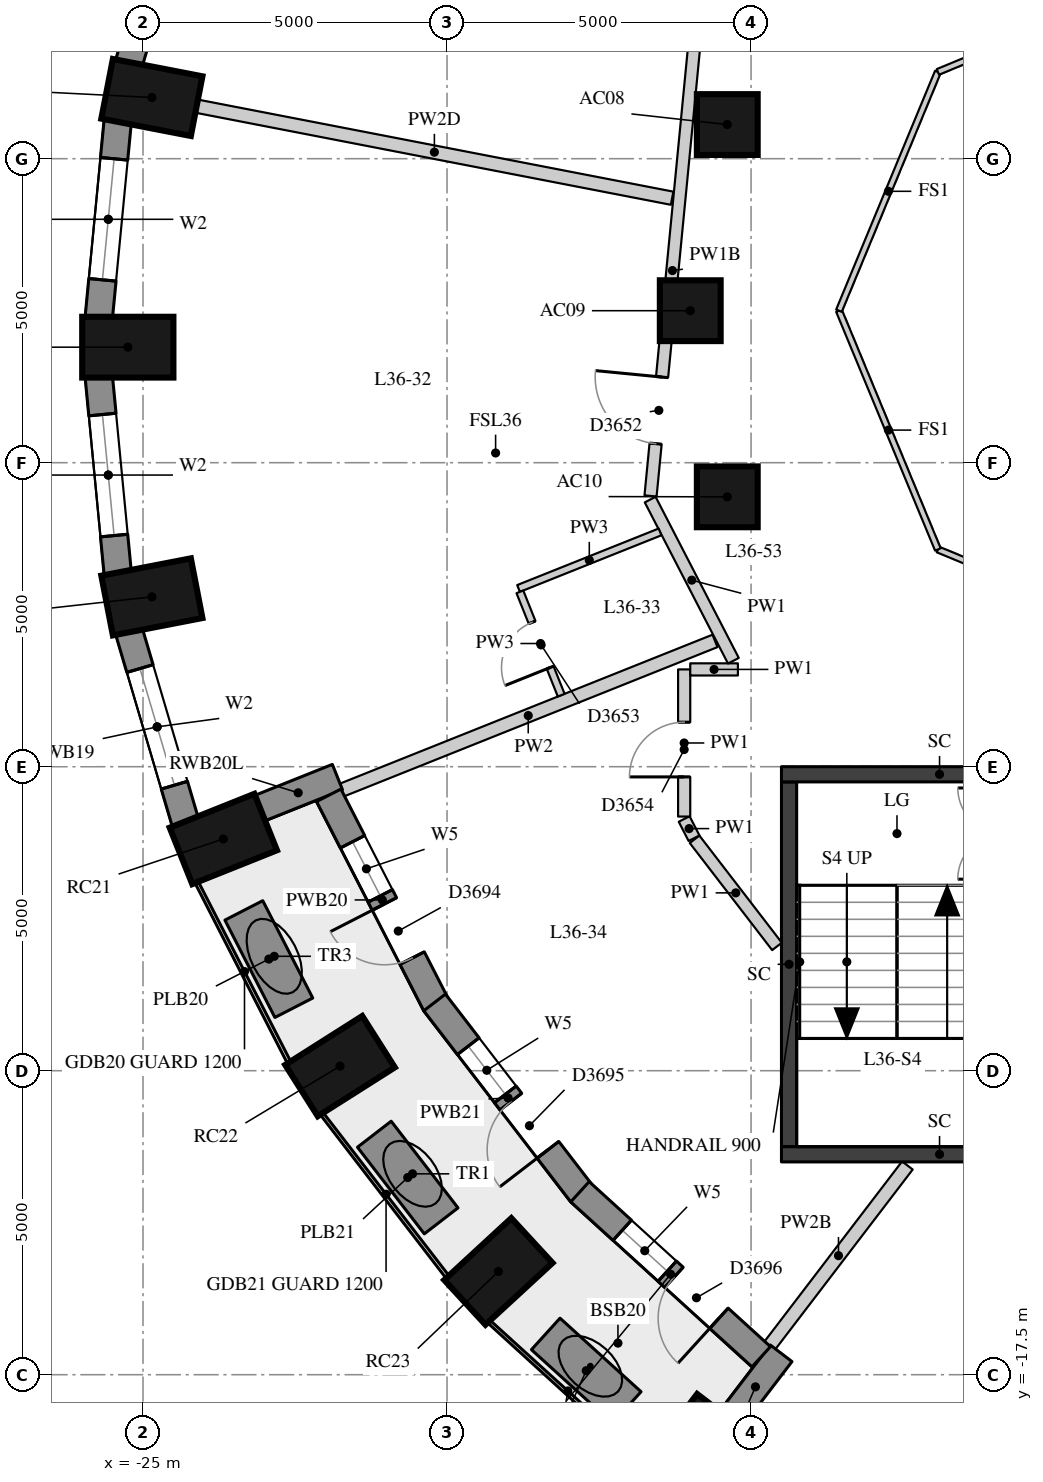
"""IFC4 building model, lengths in metres.
Left out: names, types, materials, properties, quantities, classifications, styles, units other than length and angle.
Written with IfcOpenShell. Run it as: python <this file> out.ifc"""

import sys

from ifc_helpers import new_model, si_unit, direction, frame, frame_2d, origin, origin_2d, place, context, subcontext, project, spatial, rectangle, extrude, element, fill, save


model = new_model("IFC4")
c1 = context("Model", 3, precision=1e-05, world=origin(), true_north=direction((0.0, 1.0)))
c2 = subcontext(c1, "Body", "Model", "MODEL_VIEW")
j1 = project(units=[si_unit("LENGTHUNIT", "METRE"), si_unit("PLANEANGLEUNIT", "RADIAN")], contexts=[c1])
p1 = place(None, origin())
s1 = spatial("IfcSite", under=j1, at=p1, CompositionType="ELEMENT")
p2 = place(p1, origin())
s2 = spatial("IfcBuilding", under=s1, at=p2, CompositionType="ELEMENT")
p3 = place(p2, frame((0.0, 0.0, 128.5)))
s3 = spatial("IfcBuildingStorey", under=s2, at=p3, CompositionType="ELEMENT", Elevation=128.5)
for number, where, z_axis, x_axis in (
    (1, (-24.854, 3.507, 0.0), (0.0, 0.0, 1.0), (-0.982, 0.19, 0.0)),
    (2, (-25.25, -0.6, 0.0), (0.0, 0.0, 1.0), (-1.0, 0.0, 0.0)),
    (3, (-24.854, -4.707, 0.0), (0.0, 0.0, 1.0), (-0.982, -0.19, 0.0)),
    (4, (-23.679, -8.689, 0.0), (0.0, 0.0, 1.0), (-0.929, -0.371, 0.0)),
    (5, (-21.76, -12.425, 0.0), (0.0, 0.0, 1.0), (-0.845, -0.536, 0.0)),
    (6, (-19.156, -15.802, 0.0), (0.0, 0.0, 1.0), (-0.735, -0.678, 0.0)),
    (7, (-15.945, -18.717, 0.0), (0.0, 0.0, 1.0), (-0.607, -0.795, 0.0)),
):
    element("IfcColumn", number, at=place(p3, frame(where, z_axis=z_axis, x_axis=x_axis)), inside=s3, PredefinedType="COLUMN", context=c2, shape_type="SweptSolid", body=[
        extrude(rectangle(XDim=1.5, YDim=1.0, at=origin_2d()), origin(), (0.0, 0.0, 1.0), 3.3),
    ])
for number, where, z_axis, x_axis in (
    (8, (-15.391, 3.062, 0.0), (0.0, 0.0, 1.0), (1.0, 0.0, 0.0)),
    (9, (-16.0, 0.0, 0.0), (0.0, 0.0, 1.0), (1.0, 0.0, 0.0)),
    (10, (-15.391, -3.062, 0.0), (0.0, 0.0, 1.0), (1.0, 0.0, 0.0)),
):
    element("IfcColumn", number, at=place(p3, frame(where, z_axis=z_axis, x_axis=x_axis)), inside=s3, PredefinedType="COLUMN", context=c2, shape_type="SweptSolid", body=[
        extrude(rectangle(XDim=1.0, YDim=1.0, at=origin_2d()), origin(), (0.0, 0.0, 1.0), 3.3),
    ])
p4 = place(p3, frame((-24.302, 7.221, 0.0), z_axis=(0.0, 0.0, 1.0), x_axis=(-0.283071248438, -0.959098883488, 0.0)))
e11 = element("IfcWall", 11, at=p4, inside=s3, PredefinedType="SOLIDWALL", context=c2, shape_type="SweptSolid", body=[
    extrude(rectangle(XDim=3.286, YDim=0.45, at=frame_2d((1.643, 0.0))), origin(), (0.0, 0.0, 1.0), 3.02),
])
p5 = place(p4, frame((0.643, 0.0, 0.4)))
e12 = element("IfcOpeningElement", 12, at=p5, cuts=e11, PredefinedType="OPENING", context=c2, shape_type="SweptSolid", body=[
    extrude(rectangle(XDim=2.0, YDim=1.75, at=frame_2d((1.0, 0.875))), frame((0.0, 0.235, 0.0), z_axis=(0.0, -1.0, 0.0), x_axis=(1.0, 0.0, 0.0)), (0.0, 0.0, 1.0), 0.47),
])
p6 = place(p3, frame((-25.415, 3.126, 0.0), z_axis=(0.0, 0.0, 1.0), x_axis=(-0.095967726544, -0.995384446062, 0.0)))
e13 = element("IfcWall", 13, at=p6, inside=s3, PredefinedType="SOLIDWALL", context=c2, shape_type="SweptSolid", body=[
    extrude(rectangle(XDim=3.261, YDim=0.45, at=frame_2d((1.631, 0.0))), origin(), (0.0, 0.0, 1.0), 3.02),
])
p7 = place(p6, frame((0.631, 0.0, 0.4)))
e14 = element("IfcOpeningElement", 14, at=p7, cuts=e13, PredefinedType="OPENING", context=c2, shape_type="SweptSolid", body=[
    extrude(rectangle(XDim=2.0, YDim=1.75, at=frame_2d((1.0, 0.875))), frame((0.0, 0.235, 0.0), z_axis=(0.0, -1.0, 0.0), x_axis=(1.0, 0.0, 0.0)), (0.0, 0.0, 1.0), 0.47),
])
p8 = place(p3, frame((-25.728, -1.08, 0.0), z_axis=(0.0, 0.0, 1.0), x_axis=(0.095967726544, -0.995384446062, 0.0)))
e15 = element("IfcWall", 15, at=p8, inside=s3, PredefinedType="SOLIDWALL", context=c2, shape_type="SweptSolid", body=[
    extrude(rectangle(XDim=3.261, YDim=0.45, at=frame_2d((1.631, 0.0))), origin(), (0.0, 0.0, 1.0), 3.02),
])
p9 = place(p8, frame((0.631, 0.0, 0.4)))
e16 = element("IfcOpeningElement", 16, at=p9, cuts=e15, PredefinedType="OPENING", context=c2, shape_type="SweptSolid", body=[
    extrude(rectangle(XDim=2.0, YDim=1.75, at=frame_2d((1.0, 0.875))), frame((0.0, 0.235, 0.0), z_axis=(0.0, -1.0, 0.0), x_axis=(1.0, 0.0, 0.0)), (0.0, 0.0, 1.0), 0.47),
])
p10 = place(p3, frame((-25.232, -5.269, 0.0), z_axis=(0.0, 0.0, 1.0), x_axis=(0.283051078697, -0.959104836214, 0.0)))
e17 = element("IfcWall", 17, at=p10, inside=s3, PredefinedType="SOLIDWALL", context=c2, shape_type="SweptSolid", body=[
    extrude(rectangle(XDim=3.286, YDim=0.45, at=frame_2d((1.643, 0.0))), origin(), (0.0, 0.0, 1.0), 3.02),
])
p11 = place(p10, frame((0.643, 0.0, 0.4)))
e18 = element("IfcOpeningElement", 18, at=p11, cuts=e17, PredefinedType="OPENING", context=c2, shape_type="SweptSolid", body=[
    extrude(rectangle(XDim=2.0, YDim=1.75, at=frame_2d((1.0, 0.875))), frame((0.0, 0.235, 0.0), z_axis=(0.0, -1.0, 0.0), x_axis=(1.0, 0.0, 0.0)), (0.0, 0.0, 1.0), 0.47),
])
p12 = place(p3, frame((-23.093, -8.187, 0.0), z_axis=(0.0, 0.0, 1.0), x_axis=(0.928549333349, 0.371209018665, 0.0)))
e19 = element("IfcWall", 19, at=p12, inside=s3, PredefinedType="SOLIDWALL", context=c2, shape_type="SweptSolid", body=[
    extrude(rectangle(XDim=1.39, YDim=0.45, at=frame_2d((0.695, 0.0))), origin(), (0.0, 0.0, 1.0), 3.02),
])
p13 = place(p3, frame((-15.35, -18.253, 0.0), z_axis=(0.0, 0.0, 1.0), x_axis=(0.607026495834, 0.794681592435, 0.0)))
e20 = element("IfcWall", 20, at=p13, inside=s3, PredefinedType="SOLIDWALL", context=c2, shape_type="SweptSolid", body=[
    extrude(rectangle(XDim=1.391, YDim=0.45, at=frame_2d((0.695, 0.0))), origin(), (0.0, 0.0, 1.0), 2.57),
])
p14 = place(p3, frame((-21.945, -7.97, 0.0), z_axis=(0.0, 0.0, 1.0), x_axis=(0.455905146579, -0.89002836883, 0.0)))
e21 = element("IfcWall", 21, at=p14, inside=s3, PredefinedType="SOLIDWALL", context=c2, shape_type="SweptSolid", body=[
    extrude(rectangle(XDim=3.867, YDim=0.45, at=frame_2d((1.934, 0.0))), origin(), (0.0, 0.0, 1.0), 3.02),
])
p15 = place(p14, frame((0.858, 0.0, 0.4)))
e22 = element("IfcOpeningElement", 22, at=p15, cuts=e21, PredefinedType="OPENING", context=c2, shape_type="SweptSolid", body=[
    extrude(rectangle(XDim=1.0, YDim=1.75, at=frame_2d((0.5, 0.875))), frame((0.0, 0.235, 0.0), z_axis=(0.0, -1.0, 0.0), x_axis=(1.0, 0.0, 0.0)), (0.0, 0.0, 1.0), 0.47),
])
p16 = place(p14, frame((2.009, 0.0, 0.0)))
e23 = element("IfcOpeningElement", 23, at=p16, cuts=e21, PredefinedType="OPENING", context=c2, shape_type="SweptSolid", body=[
    extrude(rectangle(XDim=1.0, YDim=2.15, at=frame_2d((0.5, 1.075))), frame((0.0, 0.235, 0.0), z_axis=(0.0, -1.0, 0.0), x_axis=(1.0, 0.0, 0.0)), (0.0, 0.0, 1.0), 0.47),
])
p17 = place(p3, frame((-20.204, -11.377, 0.0), z_axis=(0.0, 0.0, 1.0), x_axis=(0.609698858135, -0.792633144897, 0.0)))
e24 = element("IfcWall", 24, at=p17, inside=s3, PredefinedType="SOLIDWALL", context=c2, shape_type="SweptSolid", body=[
    extrude(rectangle(XDim=3.965, YDim=0.45, at=frame_2d((1.982, 0.0))), origin(), (0.0, 0.0, 1.0), 3.02),
])
p18 = place(p17, frame((0.907, 0.0, 0.4)))
e25 = element("IfcOpeningElement", 25, at=p18, cuts=e24, PredefinedType="OPENING", context=c2, shape_type="SweptSolid", body=[
    extrude(rectangle(XDim=1.0, YDim=1.75, at=frame_2d((0.5, 0.875))), frame((0.0, 0.235, 0.0), z_axis=(0.0, -1.0, 0.0), x_axis=(1.0, 0.0, 0.0)), (0.0, 0.0, 1.0), 0.47),
])
p19 = place(p17, frame((2.058, 0.0, 0.0)))
e26 = element("IfcOpeningElement", 26, at=p19, cuts=e24, PredefinedType="OPENING", context=c2, shape_type="SweptSolid", body=[
    extrude(rectangle(XDim=1.0, YDim=2.15, at=frame_2d((0.5, 1.075))), frame((0.0, 0.235, 0.0), z_axis=(0.0, -1.0, 0.0), x_axis=(1.0, 0.0, 0.0)), (0.0, 0.0, 1.0), 0.47),
])
p20 = place(p3, frame((-17.814, -14.491, 0.0), z_axis=(0.0, 0.0, 1.0), x_axis=(0.73951517403, -0.673139886933, 0.0)))
e27 = element("IfcWall", 27, at=p20, inside=s3, PredefinedType="SOLIDWALL", context=c2, shape_type="SweptSolid", body=[
    extrude(rectangle(XDim=4.031, YDim=0.45, at=frame_2d((2.016, 0.0))), origin(), (0.0, 0.0, 1.0), 3.02),
])
p21 = place(p20, frame((0.941, 0.0, 0.4)))
e28 = element("IfcOpeningElement", 28, at=p21, cuts=e27, PredefinedType="OPENING", context=c2, shape_type="SweptSolid", body=[
    extrude(rectangle(XDim=1.0, YDim=1.75, at=frame_2d((0.5, 0.875))), frame((0.0, 0.235, 0.0), z_axis=(0.0, -1.0, 0.0), x_axis=(1.0, 0.0, 0.0)), (0.0, 0.0, 1.0), 0.47),
])
p22 = place(p20, frame((2.091, 0.0, 0.0)))
e29 = element("IfcOpeningElement", 29, at=p22, cuts=e27, PredefinedType="OPENING", context=c2, shape_type="SweptSolid", body=[
    extrude(rectangle(XDim=1.0, YDim=2.15, at=frame_2d((0.5, 1.075))), frame((0.0, 0.235, 0.0), z_axis=(0.0, -1.0, 0.0), x_axis=(1.0, 0.0, 0.0)), (0.0, 0.0, 1.0), 0.47),
])
p23 = place(p3, frame((-23.342, -9.864, 0.0), z_axis=(0.0, 0.0, 1.0), x_axis=(0.456845298981, -0.88954616114, 0.0)))
e30 = element("IfcWall", 30, at=p23, inside=s3, PredefinedType="USERDEFINED", context=c2, shape_type="SweptSolid", body=[
    extrude(rectangle(XDim=1.8, YDim=0.7, at=frame_2d((0.9, 0.0))), origin(), (0.0, 0.0, 1.0), 0.75),
])
p24 = place(p3, frame((-21.196, -13.544, 0.0), z_axis=(0.0, 0.0, 1.0), x_axis=(0.610686846919, -0.791872196127, 0.0)))
e31 = element("IfcWall", 31, at=p24, inside=s3, PredefinedType="USERDEFINED", context=c2, shape_type="SweptSolid", body=[
    extrude(rectangle(XDim=1.8, YDim=0.7, at=frame_2d((0.9, 0.0))), origin(), (0.0, 0.0, 1.0), 0.75),
])
p25 = place(p3, frame((-18.377, -16.829, 0.0), z_axis=(0.0, 0.0, 1.0), x_axis=(0.740332755969, -0.6722405897, 0.0)))
e32 = element("IfcWall", 32, at=p25, inside=s3, PredefinedType="USERDEFINED", context=c2, shape_type="SweptSolid", body=[
    extrude(rectangle(XDim=1.8, YDim=0.7, at=frame_2d((0.9, 0.0))), origin(), (0.0, 0.0, 1.0), 0.75),
])
p26 = place(p3, frame((-14.375, -13.75, -0.28), z_axis=(0.0, 0.0, 1.0), x_axis=(0.0, 1.0, 0.0)))
e33 = element("IfcWall", 33, at=p26, inside=s3, PredefinedType="SHEAR", context=c2, shape_type="SweptSolid", body=[
    extrude(rectangle(XDim=6.0, YDim=0.25, at=frame_2d((3.0, 0.0))), origin(), (0.0, 0.0, 1.0), 3.3),
])
for number, where, z_axis, x_axis in (
    (34, (-14.5, -7.625, -0.28), (0.0, 0.0, 1.0), (1.0, 0.0, 0.0)),
    (35, (-14.5, -13.875, -0.28), (0.0, 0.0, 1.0), (1.0, 0.0, 0.0)),
):
    element("IfcWall", number, at=place(p3, frame(where, z_axis=z_axis, x_axis=x_axis)), inside=s3, PredefinedType="SHEAR", context=c2, shape_type="SweptSolid", body=[
        extrude(rectangle(XDim=5.2, YDim=0.25, at=frame_2d((2.6, 0.0))), origin(), (0.0, 0.0, 1.0), 3.3),
    ])
p27 = place(p3, frame((-14.573, -10.456, 0.0), z_axis=(0.0, 0.0, 1.0), x_axis=(-0.60967360535, 0.792652568872, 0.0)))
e36 = element("IfcWall", 36, at=p27, inside=s3, PredefinedType="PARTITIONING", context=c2, shape_type="SweptSolid", body=[
    extrude(rectangle(XDim=2.223, YDim=0.2, at=frame_2d((1.111, 0.0))), origin(), (0.0, 0.0, 1.0), 3.02),
])
p28 = place(p3, frame((-15.938, -8.676, 0.0), z_axis=(0.0, 0.0, 1.0), x_axis=(-0.456525695549, 0.889710227717, 0.0)))
e37 = element("IfcWall", 37, at=p28, inside=s3, PredefinedType="PARTITIONING", context=c2, shape_type="SweptSolid", body=[
    extrude(rectangle(XDim=0.356, YDim=0.2, at=frame_2d((0.178, 0.0))), origin(), (0.0, 0.0, 1.0), 3.02),
])
p29 = place(p3, frame((-16.1, -8.32, 0.0), z_axis=(0.0, 0.0, 1.0), x_axis=(0.0, 1.0, 0.0)))
e38 = element("IfcWall", 38, at=p29, inside=s3, PredefinedType="PARTITIONING", context=c2, shape_type="SweptSolid", body=[
    extrude(rectangle(XDim=2.42, YDim=0.2, at=frame_2d((1.21, 0.0))), origin(), (0.0, 0.0, 1.0), 3.02),
])
p30 = place(p29, frame((0.652, 0.0, 0.0)))
e39 = element("IfcOpeningElement", 39, at=p30, cuts=e38, PredefinedType="OPENING", context=c2, shape_type="SweptSolid", body=[
    extrude(rectangle(XDim=0.9, YDim=2.1, at=frame_2d((0.45, 1.05))), frame((0.0, 0.11, 0.0), z_axis=(0.0, -1.0, 0.0), x_axis=(1.0, 0.0, 0.0)), (0.0, 0.0, 1.0), 0.22),
])
p31 = place(p3, frame((-16.0, -5.9, 0.0), z_axis=(0.0, 0.0, 1.0), x_axis=(1.0, 0.0, 0.0)))
e40 = element("IfcWall", 40, at=p31, inside=s3, PredefinedType="PARTITIONING", context=c2, shape_type="SweptSolid", body=[
    extrude(rectangle(XDim=0.784, YDim=0.2, at=frame_2d((0.392, 0.0))), origin(), (0.0, 0.0, 1.0), 3.02),
])
p32 = place(p3, frame((-15.291, -5.757, 0.0), z_axis=(0.0, 0.0, 1.0), x_axis=(-0.45873256191, 0.888574384418, 0.0)))
e41 = element("IfcWall", 41, at=p32, inside=s3, PredefinedType="PARTITIONING", context=c2, shape_type="SweptSolid", body=[
    extrude(rectangle(XDim=2.983, YDim=0.2, at=frame_2d((1.491, 0.0))), origin(), (0.0, 0.0, 1.0), 3.02),
])
p33 = place(p3, frame((-16.653, -3.047, 0.0), z_axis=(0.0, 0.0, 1.0), x_axis=(0.096559879606, 0.995327177189, 0.0)))
e42 = element("IfcWall", 42, at=p33, inside=s3, PredefinedType="PARTITIONING", context=c2, shape_type="SweptSolid", body=[
    extrude(rectangle(XDim=7.449, YDim=0.2, at=frame_2d((3.724, 0.0))), origin(), (0.0, 0.0, 1.0), 2.52),
])
p34 = place(p33, frame((0.864, 0.0, 0.0)))
e43 = element("IfcOpeningElement", 43, at=p34, cuts=e42, PredefinedType="OPENING", context=c2, shape_type="SweptSolid", body=[
    extrude(rectangle(XDim=1.1, YDim=2.1, at=frame_2d((0.55, 1.05))), frame((0.0, 0.11, 0.0), z_axis=(0.0, -1.0, 0.0), x_axis=(1.0, 0.0, 0.0)), (0.0, 0.0, 1.0), 0.22),
])
p35 = place(p3, frame((-24.118, 3.364, 0.0), z_axis=(0.0, 0.0, 1.0), x_axis=(0.981757892546, -0.190135321348, 0.0)))
e44 = element("IfcWall", 44, at=p35, inside=s3, PredefinedType="PARTITIONING", context=c2, shape_type="SweptSolid", body=[
    extrude(rectangle(XDim=7.965, YDim=0.22, at=frame_2d((3.982, 0.0))), origin(), (0.0, 0.0, 1.0), 2.47),
])
p36 = place(p3, frame((-21.736, -7.887, 0.0), z_axis=(0.0, 0.0, 1.0), x_axis=(0.928547942842, 0.371212496884, 0.0)))
e45 = element("IfcWall", 45, at=p36, inside=s3, PredefinedType="PARTITIONING", context=c2, shape_type="SweptSolid", body=[
    extrude(rectangle(XDim=6.615, YDim=0.22, at=frame_2d((3.308, 0.0))), origin(), (0.0, 0.0, 1.0), 3.02),
])
p37 = place(p3, frame((-14.696, -17.025, 0.0), z_axis=(0.0, 0.0, 1.0), x_axis=(0.607059278405, 0.794656550028, 0.0)))
e46 = element("IfcWall", 46, at=p37, inside=s3, PredefinedType="PARTITIONING", context=c2, shape_type="SweptSolid", body=[
    extrude(rectangle(XDim=3.734, YDim=0.22, at=frame_2d((1.867, 0.0))), origin(), (0.0, 0.0, 1.0), 2.57),
])
p38 = place(p3, frame((-16.497, -3.638, 0.0), z_axis=(0.0, 0.0, 1.0), x_axis=(-0.92857071808, -0.371155522019, 0.0)))
e47 = element("IfcWall", 47, at=p38, inside=s3, PredefinedType="PARTITIONING", context=c2, shape_type="SweptSolid", body=[
    extrude(rectangle(XDim=2.506, YDim=0.12, at=frame_2d((1.253, 0.0))), origin(), (0.0, 0.0, 1.0), 3.02),
])
p39 = place(p3, frame((-18.802, -4.624, 0.0), z_axis=(0.0, 0.0, 1.0), x_axis=(0.371229680537, -0.928541073022, 0.0)))
e48 = element("IfcWall", 48, at=p39, inside=s3, PredefinedType="PARTITIONING", context=c2, shape_type="SweptSolid", body=[
    extrude(rectangle(XDim=1.83, YDim=0.12, at=frame_2d((0.915, 0.0))), origin(), (0.0, 0.0, 1.0), 3.02),
])
p40 = place(p39, frame((0.54, 0.0, 0.0)))
e49 = element("IfcOpeningElement", 49, at=p40, cuts=e48, PredefinedType="OPENING", context=c2, shape_type="SweptSolid", body=[
    extrude(rectangle(XDim=0.8, YDim=2.1, at=frame_2d((0.4, 1.05))), frame((0.0, 0.07, 0.0), z_axis=(0.0, -1.0, 0.0), x_axis=(1.0, 0.0, 0.0)), (0.0, 0.0, 1.0), 0.14),
])
for number, where, z_axis, x_axis in (
    (50, (-8.0, -5.554, 0.0), (0.0, 0.0, 1.0), (-0.924, 0.383, 0.0)),
    (51, (-11.927, -3.927, 0.0), (0.0, 0.0, 1.0), (-0.383, 0.924, 0.0)),
    (52, (-13.554, 0.0, 0.0), (0.0, 0.0, 1.0), (0.383, 0.924, 0.0)),
    (53, (-11.927, 3.927, 0.0), (0.0, 0.0, 1.0), (0.924, 0.383, 0.0)),
):
    element("IfcWall", number, at=place(p3, frame(where, z_axis=z_axis, x_axis=x_axis)), inside=s3, PredefinedType="PARTITIONING", context=c2, shape_type="SweptSolid", body=[
        extrude(rectangle(XDim=4.251, YDim=0.1, at=frame_2d((2.125, 0.0))), origin(), (0.0, 0.0, 1.0), 3.02),
    ])
p41 = place(p7, origin())
e54 = element("IfcWindow", 54, at=p41, inside=s3, PartitioningType="SINGLE_PANEL", PredefinedType="WINDOW", context=c2, shape_type="SweptSolid", body=[
    extrude(rectangle(XDim=2.0, YDim=1.75, at=frame_2d((1.0, 0.875))), frame((0.0, 0.035, 0.0), z_axis=(0.0, -1.0, 0.0), x_axis=(1.0, 0.0, 0.0)), (0.0, 0.0, 1.0), 0.06),
])
fill(e14, e54)
p42 = place(p9, origin())
e55 = element("IfcWindow", 55, at=p42, inside=s3, PartitioningType="SINGLE_PANEL", PredefinedType="WINDOW", context=c2, shape_type="SweptSolid", body=[
    extrude(rectangle(XDim=2.0, YDim=1.75, at=frame_2d((1.0, 0.875))), frame((0.0, 0.035, 0.0), z_axis=(0.0, -1.0, 0.0), x_axis=(1.0, 0.0, 0.0)), (0.0, 0.0, 1.0), 0.06),
])
fill(e16, e55)
p43 = place(p11, origin())
e56 = element("IfcWindow", 56, at=p43, inside=s3, PartitioningType="SINGLE_PANEL", PredefinedType="WINDOW", context=c2, shape_type="SweptSolid", body=[
    extrude(rectangle(XDim=2.0, YDim=1.75, at=frame_2d((1.0, 0.875))), frame((0.0, 0.035, 0.0), z_axis=(0.0, -1.0, 0.0), x_axis=(1.0, 0.0, 0.0)), (0.0, 0.0, 1.0), 0.06),
])
fill(e18, e56)
p44 = place(p15, origin())
e57 = element("IfcWindow", 57, at=p44, inside=s3, PartitioningType="SINGLE_PANEL", PredefinedType="WINDOW", context=c2, shape_type="SweptSolid", body=[
    extrude(rectangle(XDim=1.0, YDim=1.75, at=frame_2d((0.5, 0.875))), frame((0.0, 0.035, 0.0), z_axis=(0.0, -1.0, 0.0), x_axis=(1.0, 0.0, 0.0)), (0.0, 0.0, 1.0), 0.06),
])
fill(e22, e57)
p45 = place(p16, frame((1.0, 0.0, 0.0), z_axis=(0.0, 0.0, 1.0), x_axis=(-1.0, 0.0, 0.0)))
e58 = element("IfcDoor", 58, at=p45, inside=s3, OperationType="SINGLE_SWING_RIGHT", PredefinedType="DOOR", context=c2, shape_type="SweptSolid", body=[
    extrude(rectangle(XDim=1.0, YDim=2.15, at=frame_2d((0.5, 1.075))), frame((0.0, 0.075, 0.0), z_axis=(0.0, -1.0, 0.0), x_axis=(1.0, 0.0, 0.0)), (0.0, 0.0, 1.0), 0.05),
])
fill(e23, e58)
p46 = place(p18, origin())
e59 = element("IfcWindow", 59, at=p46, inside=s3, PartitioningType="SINGLE_PANEL", PredefinedType="WINDOW", context=c2, shape_type="SweptSolid", body=[
    extrude(rectangle(XDim=1.0, YDim=1.75, at=frame_2d((0.5, 0.875))), frame((0.0, 0.035, 0.0), z_axis=(0.0, -1.0, 0.0), x_axis=(1.0, 0.0, 0.0)), (0.0, 0.0, 1.0), 0.06),
])
fill(e25, e59)
p47 = place(p19, frame((1.0, 0.0, 0.0), z_axis=(0.0, 0.0, 1.0), x_axis=(-1.0, 0.0, 0.0)))
e60 = element("IfcDoor", 60, at=p47, inside=s3, OperationType="SINGLE_SWING_LEFT", PredefinedType="DOOR", context=c2, shape_type="SweptSolid", body=[
    extrude(rectangle(XDim=1.0, YDim=2.15, at=frame_2d((0.5, 1.075))), frame((0.0, 0.075, 0.0), z_axis=(0.0, -1.0, 0.0), x_axis=(1.0, 0.0, 0.0)), (0.0, 0.0, 1.0), 0.05),
])
fill(e26, e60)
p48 = place(p21, origin())
e61 = element("IfcWindow", 61, at=p48, inside=s3, PartitioningType="SINGLE_PANEL", PredefinedType="WINDOW", context=c2, shape_type="SweptSolid", body=[
    extrude(rectangle(XDim=1.0, YDim=1.75, at=frame_2d((0.5, 0.875))), frame((0.0, 0.035, 0.0), z_axis=(0.0, -1.0, 0.0), x_axis=(1.0, 0.0, 0.0)), (0.0, 0.0, 1.0), 0.06),
])
fill(e28, e61)
p49 = place(p22, frame((1.0, 0.0, 0.0), z_axis=(0.0, 0.0, 1.0), x_axis=(-1.0, 0.0, 0.0)))
e62 = element("IfcDoor", 62, at=p49, inside=s3, OperationType="SINGLE_SWING_LEFT", PredefinedType="DOOR", context=c2, shape_type="SweptSolid", body=[
    extrude(rectangle(XDim=1.0, YDim=2.15, at=frame_2d((0.5, 1.075))), frame((0.0, 0.075, 0.0), z_axis=(0.0, -1.0, 0.0), x_axis=(1.0, 0.0, 0.0)), (0.0, 0.0, 1.0), 0.05),
])
fill(e29, e62)
p50 = place(p34, origin())
e63 = element("IfcDoor", 63, at=p50, inside=s3, OperationType="SINGLE_SWING_RIGHT", PredefinedType="DOOR", context=c2, shape_type="SweptSolid", body=[
    extrude(rectangle(XDim=1.1, YDim=2.1, at=frame_2d((0.55, 1.05))), frame((0.0, 0.025, 0.0), z_axis=(0.0, -1.0, 0.0), x_axis=(1.0, 0.0, 0.0)), (0.0, 0.0, 1.0), 0.05),
])
fill(e43, e63)
p51 = place(p40, origin())
e64 = element("IfcDoor", 64, at=p51, inside=s3, OperationType="SINGLE_SWING_LEFT", PredefinedType="DOOR", context=c2, shape_type="SweptSolid", body=[
    extrude(rectangle(XDim=0.8, YDim=2.1, at=frame_2d((0.4, 1.05))), frame((0.0, 0.025, 0.0), z_axis=(0.0, -1.0, 0.0), x_axis=(1.0, 0.0, 0.0)), (0.0, 0.0, 1.0), 0.05),
])
fill(e49, e64)
p52 = place(p30, origin())
e65 = element("IfcDoor", 65, at=p52, inside=s3, OperationType="SINGLE_SWING_LEFT", PredefinedType="DOOR", context=c2, shape_type="SweptSolid", body=[
    extrude(rectangle(XDim=0.9, YDim=2.1, at=frame_2d((0.45, 1.05))), frame((0.0, 0.025, 0.0), z_axis=(0.0, -1.0, 0.0), x_axis=(1.0, 0.0, 0.0)), (0.0, 0.0, 1.0), 0.05),
])
fill(e39, e65)
save(model, sys.argv[1])
